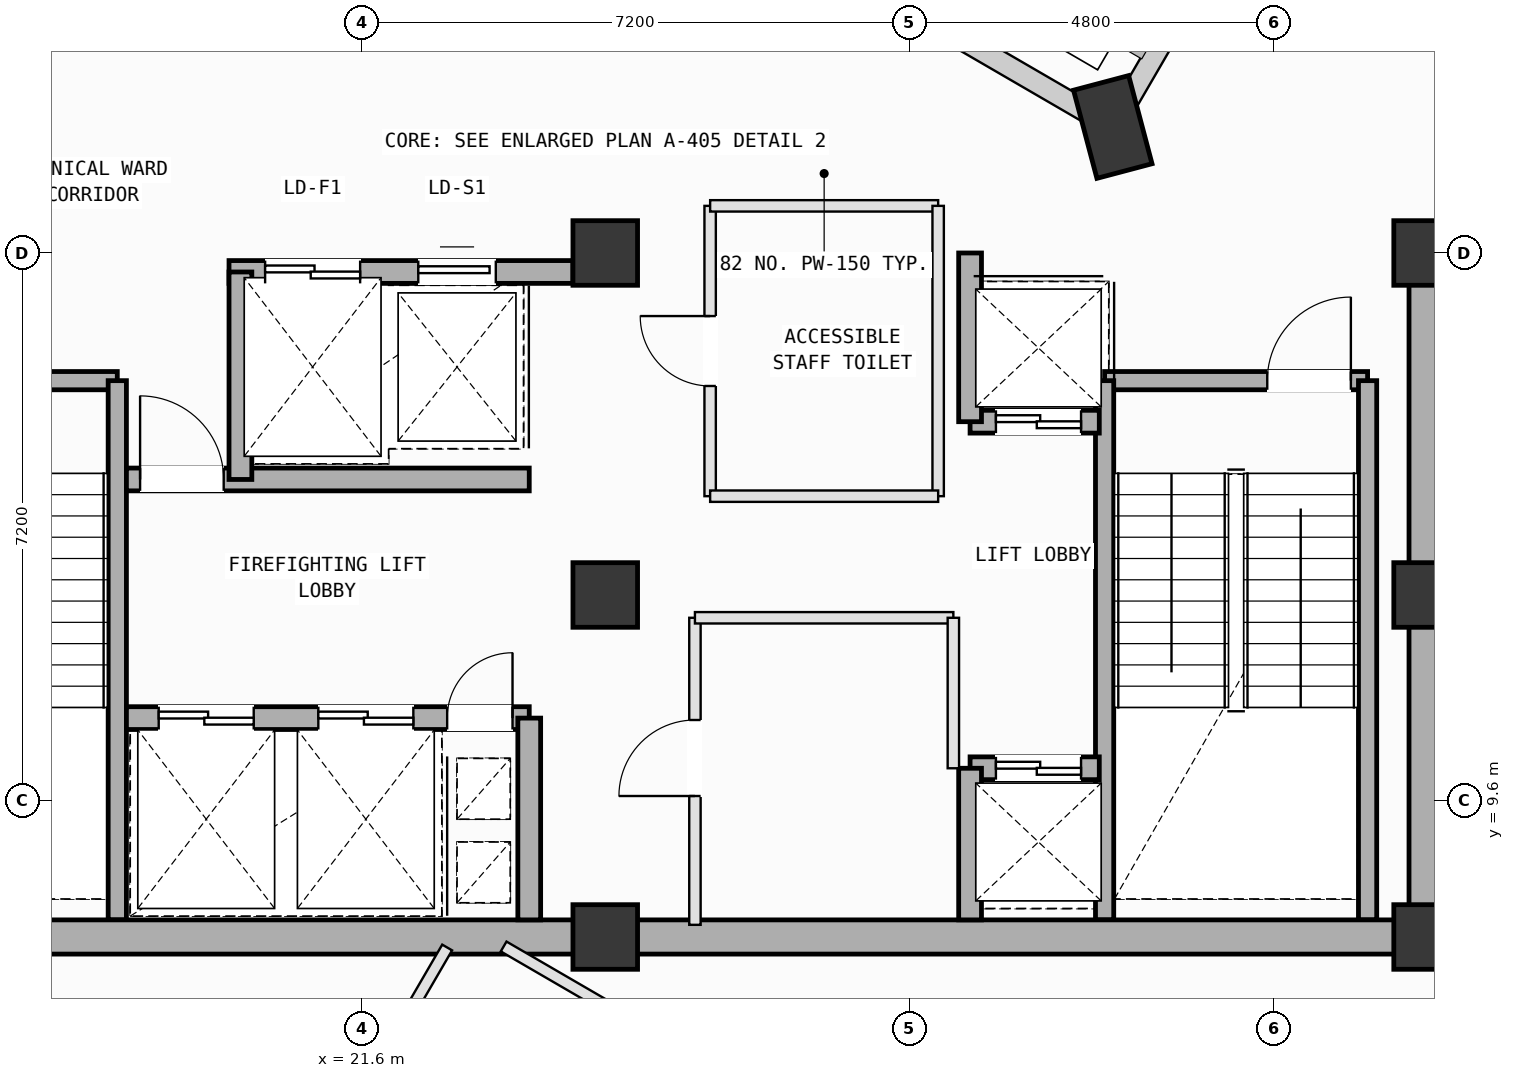
"""IFC4 building model, lengths in metres.
Left out: names, types, materials, properties, quantities, classifications, styles, units other than length and angle.
Written with IfcOpenShell. Run it as: python <this file> out.ifc"""

import sys

from ifc_helpers import new_model, si_unit, direction, frame, frame_2d, origin, origin_2d, place, context, subcontext, project, spatial, rectangle, extrude, element, fill, save


model = new_model("IFC4")
c1 = context("Model", 3, precision=1e-05, world=origin(), true_north=direction((0.0, 1.0)))
c2 = subcontext(c1, "Body", "Model", "MODEL_VIEW")
j1 = project(units=[si_unit("LENGTHUNIT", "METRE"), si_unit("PLANEANGLEUNIT", "RADIAN")], contexts=[c1])
p1 = place(None, origin())
s1 = spatial("IfcSite", under=j1, at=p1, CompositionType="ELEMENT")
p2 = place(p1, origin())
s2 = spatial("IfcBuilding", under=s1, at=p2, CompositionType="ELEMENT")
p3 = place(p2, frame((0.0, 0.0, 280.6)))
s3 = spatial("IfcBuildingStorey", under=s2, at=p3, CompositionType="ELEMENT", Elevation=280.6)
for number, where, z_axis, x_axis in (
    (1, (24.8, 7.8, 0.0), (0.0, 0.0, 1.0), (1.0, 0.0, 0.0)),
    (2, (24.8, 12.3, 0.0), (0.0, 0.0, 1.0), (1.0, 0.0, 0.0)),
    (3, (24.8, 16.8, 0.0), (0.0, 0.0, 1.0), (1.0, 0.0, 0.0)),
    (4, (35.6, 7.8, 0.0), (0.0, 0.0, 1.0), (1.0, 0.0, 0.0)),
    (5, (35.6, 12.3, 0.0), (0.0, 0.0, 1.0), (1.0, 0.0, 0.0)),
    (6, (35.6, 16.8, 0.0), (0.0, 0.0, 1.0), (1.0, 0.0, 0.0)),
):
    element("IfcColumn", number, at=place(p3, frame(where, z_axis=z_axis, x_axis=x_axis)), inside=s3, PredefinedType="COLUMN", context=c2, shape_type="SweptSolid", body=[
        extrude(rectangle(XDim=0.85, YDim=0.85, at=origin_2d()), origin(), (0.0, 0.0, 1.0), 4.0),
    ])
p4 = place(p3, frame((31.478, 18.458, 0.002), z_axis=(0.026381199272, -0.008549462727, 0.999615395546), x_axis=(-0.99817719422, 0.0540716482, 0.026805704603)))
e7 = element("IfcColumn", 7, at=p4, inside=s3, PredefinedType="COLUMN", context=c2, shape_type="SweptSolid", body=[
    extrude(rectangle(XDim=1.2, YDim=0.75, at=origin_2d()), origin(), (0.0, 0.0, 1.0), 3.998),
])
p5 = place(p3, frame((31.681, 18.809, 0.0), z_axis=(0.0, 0.0, 1.0), x_axis=(0.50225314976, 0.864720633243, 0.0)))
e8 = element("IfcWall", 8, at=p5, inside=s3, PredefinedType="SOLIDWALL", context=c2, shape_type="SweptSolid", body=[
    extrude(rectangle(XDim=6.158, YDim=0.28, at=frame_2d((3.079, 0.0))), origin(), (0.0, 0.0, 1.0), 3.265),
])
p6 = place(p5, frame((3.642, 0.0, 0.75)))
e9 = element("IfcOpeningElement", 9, at=p6, cuts=e8, PredefinedType="OPENING", context=c2, shape_type="SweptSolid", body=[
    extrude(rectangle(XDim=1.8, YDim=2.05, at=frame_2d((0.9, 1.025))), frame((0.0, 0.15, 0.0), z_axis=(0.0, -1.0, 0.0), x_axis=(1.0, 0.0, 0.0)), (0.0, 0.0, 1.0), 0.3),
])
p7 = place(p3, frame((25.164, 22.125, 0.0), z_axis=(0.0, 0.0, 1.0), x_axis=(0.864712756105, -0.502266711448, 0.0)))
e10 = element("IfcWall", 10, at=p7, inside=s3, PredefinedType="SOLIDWALL", context=c2, shape_type="SweptSolid", body=[
    extrude(rectangle(XDim=6.958, YDim=0.28, at=frame_2d((3.479, 0.0))), origin(), (0.0, 0.0, 1.0), 3.165),
])
p8 = place(p3, frame((14.92, 15.12, 0.0), z_axis=(0.0, 0.0, 1.0), x_axis=(1.0, 0.0, 0.0)))
e11 = element("IfcWall", 11, at=p8, inside=s3, PredefinedType="SOLIDWALL", context=c2, shape_type="SweptSolid", body=[
    extrude(rectangle(XDim=3.46, YDim=0.24, at=frame_2d((1.73, 0.0))), origin(), (0.0, 0.0, 1.0), 3.78),
])
p9 = place(p8, frame((0.22, 0.0, 0.0)))
e12 = element("IfcOpeningElement", 12, at=p9, cuts=e11, PredefinedType="OPENING", context=c2, shape_type="SweptSolid", body=[
    extrude(rectangle(XDim=1.1, YDim=2.15, at=frame_2d((0.55, 1.075))), frame((0.0, 0.13, 0.0), z_axis=(0.0, -1.0, 0.0), x_axis=(1.0, 0.0, 0.0)), (0.0, 0.0, 1.0), 0.26),
])
p10 = place(p3, frame((18.38, 15.12, 0.0), z_axis=(0.0, 0.0, 1.0), x_axis=(0.0, -1.0, 0.0)))
e13 = element("IfcWall", 13, at=p10, inside=s3, PredefinedType="SOLIDWALL", context=c2, shape_type="SweptSolid", body=[
    extrude(rectangle(XDim=7.095, YDim=0.24, at=frame_2d((3.548, 0.0))), origin(), (0.0, 0.0, 1.0), 3.78),
])
p11 = place(p3, frame((31.37, 15.12, 0.0), z_axis=(0.0, 0.0, 1.0), x_axis=(1.0, 0.0, 0.0)))
e14 = element("IfcWall", 14, at=p11, inside=s3, PredefinedType="SOLIDWALL", context=c2, shape_type="SweptSolid", body=[
    extrude(rectangle(XDim=3.46, YDim=0.24, at=frame_2d((1.73, 0.0))), origin(), (0.0, 0.0, 1.0), 3.78),
])
p12 = place(p11, frame((2.14, 0.0, 0.0)))
e15 = element("IfcOpeningElement", 15, at=p12, cuts=e14, PredefinedType="OPENING", context=c2, shape_type="SweptSolid", body=[
    extrude(rectangle(XDim=1.1, YDim=2.15, at=frame_2d((0.55, 1.075))), frame((0.0, 0.13, 0.0), z_axis=(0.0, -1.0, 0.0), x_axis=(1.0, 0.0, 0.0)), (0.0, 0.0, 1.0), 0.26),
])
for number, where, z_axis, x_axis in (
    (16, (34.83, 15.12, 0.0), (0.0, 0.0, 1.0), (0.0, -1.0, 0.0)),
    (17, (31.37, 8.025, 0.0), (0.0, 0.0, 1.0), (0.0, 1.0, 0.0)),
):
    element("IfcWall", number, at=place(p3, frame(where, z_axis=z_axis, x_axis=x_axis)), inside=s3, PredefinedType="SOLIDWALL", context=c2, shape_type="SweptSolid", body=[
        extrude(rectangle(XDim=7.095, YDim=0.24, at=frame_2d((3.548, 0.0))), origin(), (0.0, 0.0, 1.0), 3.78),
    ])
for number, where, z_axis, x_axis in (
    (18, (14.0, 7.8, 0.0), (0.0, 0.0, 1.0), (1.0, 0.0, 0.0)),
    (19, (24.8, 7.8, 0.0), (0.0, 0.0, 1.0), (1.0, 0.0, 0.0)),
):
    element("IfcWall", number, at=place(p3, frame(where, z_axis=z_axis, x_axis=x_axis)), inside=s3, PredefinedType="SHEAR", context=c2, shape_type="SweptSolid", body=[
        extrude(rectangle(XDim=10.8, YDim=0.45, at=frame_2d((5.4, 0.0))), origin(), (0.0, 0.0, 1.0), 3.78),
    ])
p13 = place(p3, frame((35.6, 7.8, 0.0), z_axis=(0.0, 0.0, 1.0), x_axis=(0.0, 1.0, 0.0)))
e20 = element("IfcWall", 20, at=p13, inside=s3, PredefinedType="SHEAR", context=c2, shape_type="SweptSolid", body=[
    extrude(rectangle(XDim=9.0, YDim=0.45, at=frame_2d((4.5, 0.0))), origin(), (0.0, 0.0, 1.0), 3.78),
])
p14 = place(p3, frame((19.85, 16.55, 0.0), z_axis=(0.0, 0.0, 1.0), x_axis=(1.0, 0.0, 0.0)))
e21 = element("IfcWall", 21, at=p14, inside=s3, PredefinedType="SOLIDWALL", context=c2, shape_type="SweptSolid", body=[
    extrude(rectangle(XDim=4.525, YDim=0.3, at=frame_2d((2.262, 0.0))), origin(), (0.0, 0.0, 1.0), 3.78),
])
p15 = place(p14, frame((0.475, 0.0, 0.0)))
e22 = element("IfcOpeningElement", 22, at=p15, cuts=e21, PredefinedType="OPENING", context=c2, shape_type="SweptSolid", body=[
    extrude(rectangle(XDim=1.25, YDim=2.18, at=frame_2d((0.625, 1.09))), frame((0.0, 0.16, 0.0), z_axis=(0.0, -1.0, 0.0), x_axis=(1.0, 0.0, 0.0)), (0.0, 0.0, 1.0), 0.32),
])
p16 = place(p14, frame((2.49, 0.0, 0.0)))
e23 = element("IfcOpeningElement", 23, at=p16, cuts=e21, PredefinedType="OPENING", context=c2, shape_type="SweptSolid", body=[
    extrude(rectangle(XDim=1.02, YDim=2.12, at=frame_2d((0.51, 1.06))), frame((0.0, 0.16, 0.0), z_axis=(0.0, -1.0, 0.0), x_axis=(1.0, 0.0, 0.0)), (0.0, 0.0, 1.0), 0.32),
])
p17 = place(p3, frame((18.5, 10.68, 0.0), z_axis=(0.0, 0.0, 1.0), x_axis=(1.0, 0.0, 0.0)))
e24 = element("IfcWall", 24, at=p17, inside=s3, PredefinedType="SOLIDWALL", context=c2, shape_type="SweptSolid", body=[
    extrude(rectangle(XDim=5.3, YDim=0.3, at=frame_2d((2.65, 0.0))), origin(), (0.0, 0.0, 1.0), 3.78),
])
p18 = place(p17, frame((4.22, 0.0, 0.0)))
e25 = element("IfcOpeningElement", 25, at=p18, cuts=e24, PredefinedType="OPENING", context=c2, shape_type="SweptSolid", body=[
    extrude(rectangle(XDim=0.86, YDim=2.06, at=frame_2d((0.43, 1.03))), frame((0.0, 0.16, 0.0), z_axis=(0.0, -1.0, 0.0), x_axis=(1.0, 0.0, 0.0)), (0.0, 0.0, 1.0), 0.32),
])
p19 = place(p17, frame((0.425, 0.0, 0.0)))
e26 = element("IfcOpeningElement", 26, at=p19, cuts=e24, PredefinedType="OPENING", context=c2, shape_type="SweptSolid", body=[
    extrude(rectangle(XDim=1.25, YDim=2.18, at=frame_2d((0.625, 1.09))), frame((0.0, 0.16, 0.0), z_axis=(0.0, -1.0, 0.0), x_axis=(1.0, 0.0, 0.0)), (0.0, 0.0, 1.0), 0.32),
])
p20 = place(p17, frame((2.525, 0.0, 0.0)))
e27 = element("IfcOpeningElement", 27, at=p20, cuts=e24, PredefinedType="OPENING", context=c2, shape_type="SweptSolid", body=[
    extrude(rectangle(XDim=1.25, YDim=2.18, at=frame_2d((0.625, 1.09))), frame((0.0, 0.16, 0.0), z_axis=(0.0, -1.0, 0.0), x_axis=(1.0, 0.0, 0.0)), (0.0, 0.0, 1.0), 0.32),
])
p21 = place(p3, frame((18.5, 13.82, 0.0), z_axis=(0.0, 0.0, 1.0), x_axis=(1.0, 0.0, 0.0)))
e28 = element("IfcWall", 28, at=p21, inside=s3, PredefinedType="SOLIDWALL", context=c2, shape_type="SweptSolid", body=[
    extrude(rectangle(XDim=5.3, YDim=0.3, at=frame_2d((2.65, 0.0))), origin(), (0.0, 0.0, 1.0), 3.78),
])
p22 = place(p21, frame((0.18, 0.0, 0.0)))
e29 = element("IfcOpeningElement", 29, at=p22, cuts=e28, PredefinedType="OPENING", context=c2, shape_type="SweptSolid", body=[
    extrude(rectangle(XDim=1.1, YDim=2.15, at=frame_2d((0.55, 1.075))), frame((0.0, 0.16, 0.0), z_axis=(0.0, -1.0, 0.0), x_axis=(1.0, 0.0, 0.0)), (0.0, 0.0, 1.0), 0.32),
])
p23 = place(p3, frame((23.8, 8.025, 0.0), z_axis=(0.0, 0.0, 1.0), x_axis=(0.0, 1.0, 0.0)))
e30 = element("IfcWall", 30, at=p23, inside=s3, PredefinedType="SOLIDWALL", context=c2, shape_type="SweptSolid", body=[
    extrude(rectangle(XDim=2.655, YDim=0.3, at=frame_2d((1.328, 0.0))), origin(), (0.0, 0.0, 1.0), 3.78),
])
p24 = place(p3, frame((20.0, 13.82, 0.0), z_axis=(0.0, 0.0, 1.0), x_axis=(0.0, 1.0, 0.0)))
e31 = element("IfcWall", 31, at=p24, inside=s3, PredefinedType="SOLIDWALL", context=c2, shape_type="SweptSolid", body=[
    extrude(rectangle(XDim=2.73, YDim=0.3, at=frame_2d((1.365, 0.0))), origin(), (0.0, 0.0, 1.0), 3.78),
])
p25 = place(p3, frame((29.6, 10.02, 0.0), z_axis=(0.0, 0.0, 1.0), x_axis=(1.0, 0.0, 0.0)))
e32 = element("IfcWall", 32, at=p25, inside=s3, PredefinedType="SOLIDWALL", context=c2, shape_type="SweptSolid", body=[
    extrude(rectangle(XDim=1.7, YDim=0.3, at=frame_2d((0.85, 0.0))), origin(), (0.0, 0.0, 1.0), 3.78),
])
p26 = place(p25, frame((0.34, 0.0, 0.0)))
e33 = element("IfcOpeningElement", 33, at=p26, cuts=e32, PredefinedType="OPENING", context=c2, shape_type="SweptSolid", body=[
    extrude(rectangle(XDim=1.12, YDim=2.15, at=frame_2d((0.56, 1.075))), frame((0.0, 0.16, 0.0), z_axis=(0.0, -1.0, 0.0), x_axis=(1.0, 0.0, 0.0)), (0.0, 0.0, 1.0), 0.32),
])
p27 = place(p3, frame((29.6, 8.025, 0.0), z_axis=(0.0, 0.0, 1.0), x_axis=(0.0, 1.0, 0.0)))
e34 = element("IfcWall", 34, at=p27, inside=s3, PredefinedType="SOLIDWALL", context=c2, shape_type="SweptSolid", body=[
    extrude(rectangle(XDim=1.995, YDim=0.3, at=frame_2d((0.998, 0.0))), origin(), (0.0, 0.0, 1.0), 3.78),
])
p28 = place(p3, frame((29.6, 14.58, 0.0), z_axis=(0.0, 0.0, 1.0), x_axis=(1.0, 0.0, 0.0)))
e35 = element("IfcWall", 35, at=p28, inside=s3, PredefinedType="SOLIDWALL", context=c2, shape_type="SweptSolid", body=[
    extrude(rectangle(XDim=1.7, YDim=0.3, at=frame_2d((0.85, 0.0))), origin(), (0.0, 0.0, 1.0), 3.78),
])
p29 = place(p28, frame((0.34, 0.0, 0.0)))
e36 = element("IfcOpeningElement", 36, at=p29, cuts=e35, PredefinedType="OPENING", context=c2, shape_type="SweptSolid", body=[
    extrude(rectangle(XDim=1.12, YDim=2.15, at=frame_2d((0.56, 1.075))), frame((0.0, 0.16, 0.0), z_axis=(0.0, -1.0, 0.0), x_axis=(1.0, 0.0, 0.0)), (0.0, 0.0, 1.0), 0.32),
])
p30 = place(p3, frame((29.6, 14.58, 0.0), z_axis=(0.0, 0.0, 1.0), x_axis=(0.0, 1.0, 0.0)))
e37 = element("IfcWall", 37, at=p30, inside=s3, PredefinedType="SOLIDWALL", context=c2, shape_type="SweptSolid", body=[
    extrude(rectangle(XDim=2.22, YDim=0.3, at=frame_2d((1.11, 0.0))), origin(), (0.0, 0.0, 1.0), 3.78),
])
p31 = place(p3, frame((25.98, 7.96, 0.0), z_axis=(0.0, 0.0, 1.0), x_axis=(0.0, 1.0, 0.0)))
e38 = element("IfcWall", 38, at=p31, inside=s3, PredefinedType="PARTITIONING", context=c2, shape_type="SweptSolid", body=[
    extrude(rectangle(XDim=4.04, YDim=0.15, at=frame_2d((2.02, 0.0))), origin(), (0.0, 0.0, 1.0), 3.78),
])
p32 = place(p31, frame((1.695, 0.0, 0.0)))
e39 = element("IfcOpeningElement", 39, at=p32, cuts=e38, PredefinedType="OPENING", context=c2, shape_type="SweptSolid", body=[
    extrude(rectangle(XDim=1.0, YDim=2.12, at=frame_2d((0.5, 1.06))), frame((0.0, 0.085, 0.0), z_axis=(0.0, -1.0, 0.0), x_axis=(1.0, 0.0, 0.0)), (0.0, 0.0, 1.0), 0.17),
])
p33 = place(p3, frame((25.98, 12.0, 0.0), z_axis=(0.0, 0.0, 1.0), x_axis=(1.0, 0.0, 0.0)))
e40 = element("IfcWall", 40, at=p33, inside=s3, PredefinedType="PARTITIONING", context=c2, shape_type="SweptSolid", body=[
    extrude(rectangle(XDim=3.4, YDim=0.15, at=frame_2d((1.7, 0.0))), origin(), (0.0, 0.0, 1.0), 3.78),
])
p34 = place(p3, frame((29.38, 12.0, 0.0), z_axis=(0.0, 0.0, 1.0), x_axis=(0.0, -1.0, 0.0)))
e41 = element("IfcWall", 41, at=p34, inside=s3, PredefinedType="PARTITIONING", context=c2, shape_type="SweptSolid", body=[
    extrude(rectangle(XDim=1.98, YDim=0.15, at=frame_2d((0.99, 0.0))), origin(), (0.0, 0.0, 1.0), 3.78),
])
p35 = place(p3, frame((26.18, 13.6, 0.0), z_axis=(0.0, 0.0, 1.0), x_axis=(0.0, 1.0, 0.0)))
e42 = element("IfcWall", 42, at=p35, inside=s3, PredefinedType="PARTITIONING", context=c2, shape_type="SweptSolid", body=[
    extrude(rectangle(XDim=3.82, YDim=0.15, at=frame_2d((1.91, 0.0))), origin(), (0.0, 0.0, 1.0), 3.78),
])
p36 = place(p35, frame((1.45, 0.0, 0.0)))
e43 = element("IfcOpeningElement", 43, at=p36, cuts=e42, PredefinedType="OPENING", context=c2, shape_type="SweptSolid", body=[
    extrude(rectangle(XDim=0.92, YDim=2.1, at=frame_2d((0.46, 1.05))), frame((0.0, 0.085, 0.0), z_axis=(0.0, -1.0, 0.0), x_axis=(1.0, 0.0, 0.0)), (0.0, 0.0, 1.0), 0.17),
])
p37 = place(p3, frame((26.18, 17.42, 0.0), z_axis=(0.0, 0.0, 1.0), x_axis=(1.0, 0.0, 0.0)))
e44 = element("IfcWall", 44, at=p37, inside=s3, PredefinedType="PARTITIONING", context=c2, shape_type="SweptSolid", body=[
    extrude(rectangle(XDim=3.0, YDim=0.15, at=frame_2d((1.5, 0.0))), origin(), (0.0, 0.0, 1.0), 3.78),
])
p38 = place(p3, frame((29.18, 17.42, 0.0), z_axis=(0.0, 0.0, 1.0), x_axis=(0.0, -1.0, 0.0)))
e45 = element("IfcWall", 45, at=p38, inside=s3, PredefinedType="PARTITIONING", context=c2, shape_type="SweptSolid", body=[
    extrude(rectangle(XDim=3.82, YDim=0.15, at=frame_2d((1.91, 0.0))), origin(), (0.0, 0.0, 1.0), 3.78),
])
p39 = place(p3, frame((29.18, 13.6, 0.0), z_axis=(0.0, 0.0, 1.0), x_axis=(-1.0, 0.0, 0.0)))
e46 = element("IfcWall", 46, at=p39, inside=s3, PredefinedType="PARTITIONING", context=c2, shape_type="SweptSolid", body=[
    extrude(rectangle(XDim=3.0, YDim=0.15, at=frame_2d((1.5, 0.0))), origin(), (0.0, 0.0, 1.0), 3.78),
])
p40 = place(p3, frame((19.179, 1.565, 0.0), z_axis=(0.0, 0.0, 1.0), x_axis=(0.502212365781, 0.864744320396, 0.0)))
e47 = element("IfcWall", 47, at=p40, inside=s3, PredefinedType="PARTITIONING", context=c2, shape_type="SweptSolid", body=[
    extrude(rectangle(XDim=7.051, YDim=0.15, at=frame_2d((3.525, 0.0))), origin(), (0.0, 0.0, 1.0), 3.78),
])
p41 = place(p3, frame((23.463, 7.675, 0.0), z_axis=(0.0, 0.0, 1.0), x_axis=(0.864698213219, -0.502291747948, 0.0)))
e48 = element("IfcWall", 48, at=p41, inside=s3, PredefinedType="PARTITIONING", context=c2, shape_type="SweptSolid", body=[
    extrude(rectangle(XDim=12.704, YDim=0.15, at=frame_2d((6.352, 0.0))), origin(), (0.0, 0.0, 1.0), 3.78),
])
p42 = place(p12, origin())
e49 = element("IfcDoor", 49, at=p42, inside=s3, OperationType="SINGLE_SWING_RIGHT", PredefinedType="DOOR", context=c2, shape_type="SweptSolid", body=[
    extrude(rectangle(XDim=1.1, YDim=2.15, at=frame_2d((0.55, 1.075))), frame((0.0, 0.025, 0.0), z_axis=(0.0, -1.0, 0.0), x_axis=(1.0, 0.0, 0.0)), (0.0, 0.0, 1.0), 0.05),
])
fill(e15, e49)
p43 = place(p18, origin())
e50 = element("IfcDoor", 50, at=p43, inside=s3, OperationType="SINGLE_SWING_RIGHT", PredefinedType="DOOR", context=c2, shape_type="SweptSolid", body=[
    extrude(rectangle(XDim=0.86, YDim=2.06, at=frame_2d((0.43, 1.03))), frame((0.0, 0.025, 0.0), z_axis=(0.0, -1.0, 0.0), x_axis=(1.0, 0.0, 0.0)), (0.0, 0.0, 1.0), 0.05),
])
fill(e25, e50)
p44 = place(p22, origin())
e51 = element("IfcDoor", 51, at=p44, inside=s3, OperationType="SINGLE_SWING_LEFT", PredefinedType="DOOR", context=c2, shape_type="SweptSolid", body=[
    extrude(rectangle(XDim=1.1, YDim=2.15, at=frame_2d((0.55, 1.075))), frame((0.0, 0.025, 0.0), z_axis=(0.0, -1.0, 0.0), x_axis=(1.0, 0.0, 0.0)), (0.0, 0.0, 1.0), 0.05),
])
fill(e29, e51)
p45 = place(p19, origin())
e52 = element("IfcDoor", 52, at=p45, inside=s3, OperationType="DOUBLE_DOOR_SLIDING", PredefinedType="DOOR", context=c2, shape_type="SweptSolid", body=[
    extrude(rectangle(XDim=1.25, YDim=2.18, at=frame_2d((0.625, 1.09))), frame((0.0, 0.025, 0.0), z_axis=(0.0, -1.0, 0.0), x_axis=(1.0, 0.0, 0.0)), (0.0, 0.0, 1.0), 0.05),
])
fill(e26, e52)
p46 = place(p20, origin())
e53 = element("IfcDoor", 53, at=p46, inside=s3, OperationType="DOUBLE_DOOR_SLIDING", PredefinedType="DOOR", context=c2, shape_type="SweptSolid", body=[
    extrude(rectangle(XDim=1.25, YDim=2.18, at=frame_2d((0.625, 1.09))), frame((0.0, 0.025, 0.0), z_axis=(0.0, -1.0, 0.0), x_axis=(1.0, 0.0, 0.0)), (0.0, 0.0, 1.0), 0.05),
])
fill(e27, e53)
p47 = place(p26, origin())
e54 = element("IfcDoor", 54, at=p47, inside=s3, OperationType="DOUBLE_DOOR_SLIDING", PredefinedType="DOOR", context=c2, shape_type="SweptSolid", body=[
    extrude(rectangle(XDim=1.12, YDim=2.15, at=frame_2d((0.56, 1.075))), frame((0.0, 0.025, 0.0), z_axis=(0.0, -1.0, 0.0), x_axis=(1.0, 0.0, 0.0)), (0.0, 0.0, 1.0), 0.05),
])
fill(e33, e54)
p48 = place(p29, origin())
e55 = element("IfcDoor", 55, at=p48, inside=s3, OperationType="DOUBLE_DOOR_SLIDING", PredefinedType="DOOR", context=c2, shape_type="SweptSolid", body=[
    extrude(rectangle(XDim=1.12, YDim=2.15, at=frame_2d((0.56, 1.075))), frame((0.0, 0.025, 0.0), z_axis=(0.0, -1.0, 0.0), x_axis=(1.0, 0.0, 0.0)), (0.0, 0.0, 1.0), 0.05),
])
fill(e36, e55)
p49 = place(p15, origin())
e56 = element("IfcDoor", 56, at=p49, inside=s3, OperationType="DOUBLE_DOOR_SLIDING", PredefinedType="DOOR", context=c2, shape_type="SweptSolid", body=[
    extrude(rectangle(XDim=1.25, YDim=2.18, at=frame_2d((0.625, 1.09))), frame((0.0, 0.025, 0.0), z_axis=(0.0, -1.0, 0.0), x_axis=(1.0, 0.0, 0.0)), (0.0, 0.0, 1.0), 0.05),
])
fill(e22, e56)
p50 = place(p16, origin())
e57 = element("IfcDoor", 57, at=p50, inside=s3, OperationType="SLIDING_TO_LEFT", PredefinedType="DOOR", context=c2, shape_type="SweptSolid", body=[
    extrude(rectangle(XDim=1.02, YDim=2.12, at=frame_2d((0.51, 1.06))), frame((0.0, 0.025, 0.0), z_axis=(0.0, -1.0, 0.0), x_axis=(1.0, 0.0, 0.0)), (0.0, 0.0, 1.0), 0.05),
])
fill(e23, e57)
p51 = place(p32, origin())
e58 = element("IfcDoor", 58, at=p51, inside=s3, OperationType="SINGLE_SWING_LEFT", PredefinedType="DOOR", context=c2, shape_type="SweptSolid", body=[
    extrude(rectangle(XDim=1.0, YDim=2.12, at=frame_2d((0.5, 1.06))), frame((0.0, 0.025, 0.0), z_axis=(0.0, -1.0, 0.0), x_axis=(1.0, 0.0, 0.0)), (0.0, 0.0, 1.0), 0.05),
])
fill(e39, e58)
p52 = place(p36, origin())
e59 = element("IfcDoor", 59, at=p52, inside=s3, OperationType="SINGLE_SWING_RIGHT", PredefinedType="DOOR", context=c2, shape_type="SweptSolid", body=[
    extrude(rectangle(XDim=0.92, YDim=2.1, at=frame_2d((0.46, 1.05))), frame((0.0, 0.025, 0.0), z_axis=(0.0, -1.0, 0.0), x_axis=(1.0, 0.0, 0.0)), (0.0, 0.0, 1.0), 0.05),
])
fill(e43, e59)
save(model, sys.argv[1])
